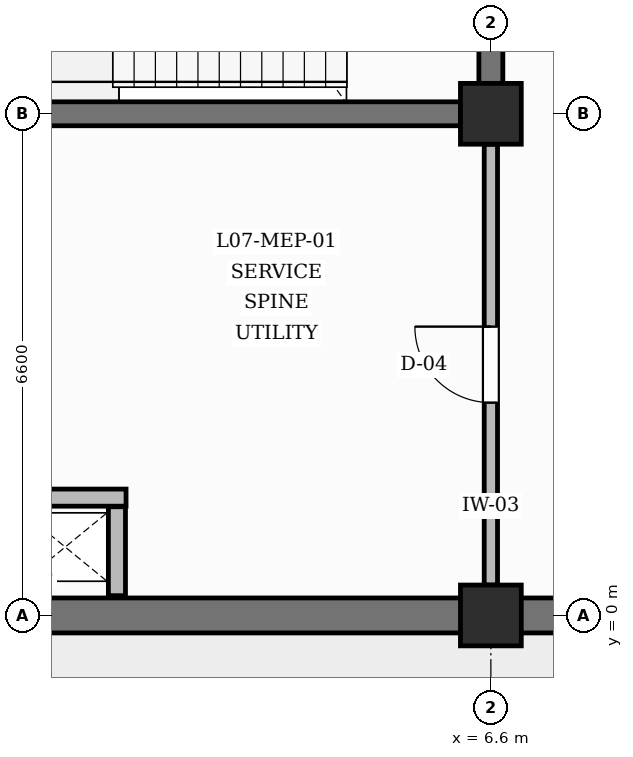
"""IFC4 building model, lengths in metres.
Left out: names, types, materials, properties, quantities, classifications, styles, units other than length and angle.
Written with IfcOpenShell. Run it as: python <this file> out.ifc"""

import sys

from ifc_helpers import new_model, si_unit, direction, frame, frame_2d, origin, origin_2d, place, context, subcontext, project, spatial, rectangle, extrude, element, fill, save


model = new_model("IFC4")
c1 = context("Model", 3, precision=1e-05, world=origin(), true_north=direction((0.0, 1.0)))
c2 = subcontext(c1, "Body", "Model", "MODEL_VIEW")
j1 = project(units=[si_unit("LENGTHUNIT", "METRE"), si_unit("PLANEANGLEUNIT", "RADIAN")], contexts=[c1])
p1 = place(None, origin())
s1 = spatial("IfcSite", under=j1, at=p1, CompositionType="ELEMENT")
p2 = place(p1, origin())
s2 = spatial("IfcBuilding", under=s1, at=p2, CompositionType="ELEMENT")
p3 = place(p2, frame((0.0, 0.0, 31.2)))
s3 = spatial("IfcBuildingStorey", under=s2, at=p3, CompositionType="ELEMENT", Elevation=31.2)
for number, where, z_axis, x_axis in (
    (1, (6.6, 0.0, 0.0), (0.0, 0.0, 1.0), (1.0, 0.0, 0.0)),
    (2, (6.6, 6.6, 0.0), (0.0, 0.0, 1.0), (1.0, 0.0, 0.0)),
):
    element("IfcColumn", number, at=place(p3, frame(where, z_axis=z_axis, x_axis=x_axis)), inside=s3, PredefinedType="COLUMN", context=c2, shape_type="SweptSolid", body=[
        extrude(rectangle(XDim=0.8, YDim=0.8, at=origin_2d()), origin(), (0.0, 0.0, 1.0), 4.2),
    ])
for number, where, z_axis, x_axis in (
    (3, (0.4, 0.0, 0.0), (0.0, 0.0, 1.0), (1.0, 0.0, 0.0)),
    (4, (7.0, 0.0, 0.0), (0.0, 0.0, 1.0), (1.0, 0.0, 0.0)),
):
    element("IfcWall", number, at=place(p3, frame(where, z_axis=z_axis, x_axis=x_axis)), inside=s3, PredefinedType="SOLIDWALL", context=c2, shape_type="SweptSolid", body=[
        extrude(rectangle(XDim=5.8, YDim=0.46, at=frame_2d((2.9, 0.0))), origin(), (0.0, 0.0, 1.0), 3.28),
    ])
p4 = place(p3, frame((0.4, 6.6, 0.0), z_axis=(0.0, 0.0, 1.0), x_axis=(1.0, 0.0, 0.0)))
e5 = element("IfcWall", 5, at=p4, inside=s3, PredefinedType="SHEAR", context=c2, shape_type="SweptSolid", body=[
    extrude(rectangle(XDim=5.8, YDim=0.315, at=frame_2d((2.9, 0.0))), origin(), (0.0, 0.0, 1.0), 3.18),
])
p5 = place(p3, frame((6.6, 7.0, 0.0), z_axis=(0.0, 0.0, 1.0), x_axis=(0.0, 1.0, 0.0)))
e6 = element("IfcWall", 6, at=p5, inside=s3, PredefinedType="SHEAR", context=c2, shape_type="SweptSolid", body=[
    extrude(rectangle(XDim=5.8, YDim=0.315, at=frame_2d((2.9, 0.0))), origin(), (0.0, 0.0, 1.0), 3.18),
])
p6 = place(p5, frame((2.35, 0.0, 0.0)))
e7 = element("IfcOpeningElement", 7, at=p6, cuts=e6, PredefinedType="OPENING", context=c2, shape_type="SweptSolid", body=[
    extrude(rectangle(XDim=1.1, YDim=2.15, at=frame_2d((0.55, 1.075))), frame((0.0, 0.167, 0.0), z_axis=(0.0, -1.0, 0.0), x_axis=(1.0, 0.0, 0.0)), (0.0, 0.0, 1.0), 0.335),
])
p7 = place(p3, frame((1.68, 0.26, 0.0), z_axis=(0.0, 0.0, 1.0), x_axis=(0.0, 1.0, 0.0)))
e8 = element("IfcWall", 8, at=p7, inside=s3, PredefinedType="PARTITIONING", context=c2, shape_type="SweptSolid", body=[
    extrude(rectangle(XDim=1.17, YDim=0.225, at=frame_2d((0.585, 0.0))), origin(), (0.0, 0.0, 1.0), 3.88),
])
p8 = place(p3, frame((0.26, 1.55, 0.0), z_axis=(0.0, 0.0, 1.0), x_axis=(1.0, 0.0, 0.0)))
e9 = element("IfcWall", 9, at=p8, inside=s3, PredefinedType="PARTITIONING", context=c2, shape_type="SweptSolid", body=[
    extrude(rectangle(XDim=1.54, YDim=0.225, at=frame_2d((0.77, 0.0))), origin(), (0.0, 0.0, 1.0), 3.88),
])
p9 = place(p3, frame((6.6, 0.4, 0.0), z_axis=(0.0, 0.0, 1.0), x_axis=(0.0, 1.0, 0.0)))
e10 = element("IfcWall", 10, at=p9, inside=s3, PredefinedType="PARTITIONING", context=c2, shape_type="SweptSolid", body=[
    extrude(rectangle(XDim=5.8, YDim=0.175, at=frame_2d((2.9, 0.0))), origin(), (0.0, 0.0, 1.0), 3.18),
])
p10 = place(p9, frame((2.4, 0.0, 0.0)))
e11 = element("IfcOpeningElement", 11, at=p10, cuts=e10, PredefinedType="OPENING", context=c2, shape_type="SweptSolid", body=[
    extrude(rectangle(XDim=1.0, YDim=2.1, at=frame_2d((0.5, 1.05))), frame((0.0, 0.097, 0.0), z_axis=(0.0, -1.0, 0.0), x_axis=(1.0, 0.0, 0.0)), (0.0, 0.0, 1.0), 0.195),
])
p11 = place(p10, origin())
e12 = element("IfcDoor", 12, at=p11, inside=s3, OperationType="SINGLE_SWING_RIGHT", PredefinedType="DOOR", context=c2, shape_type="SweptSolid", body=[
    extrude(rectangle(XDim=1.0, YDim=2.1, at=frame_2d((0.5, 1.05))), frame((0.0, 0.025, 0.0), z_axis=(0.0, -1.0, 0.0), x_axis=(1.0, 0.0, 0.0)), (0.0, 0.0, 1.0), 0.05),
])
fill(e11, e12)
save(model, sys.argv[1])
